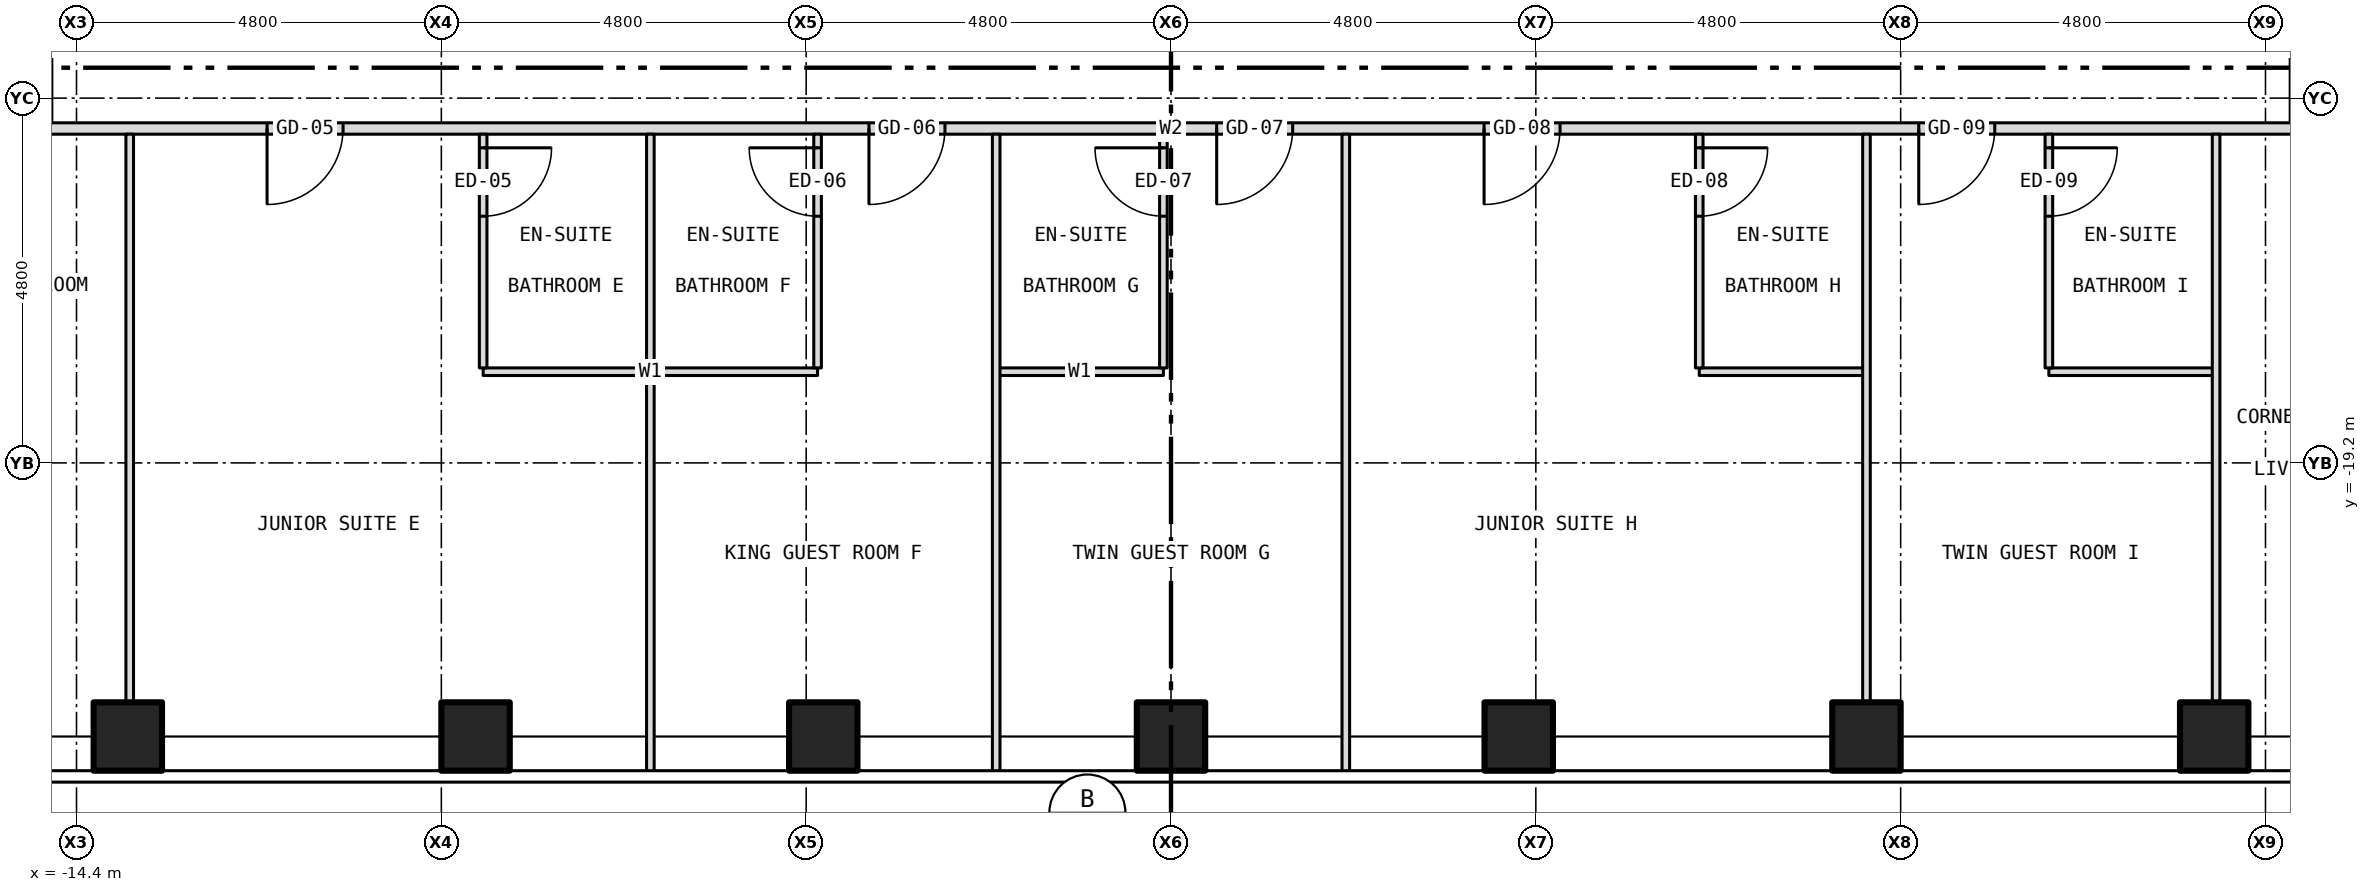
"""IFC4 building model, lengths in metres.
Left out: names, types, materials, properties, quantities, classifications, styles, units other than length and angle.
Written with IfcOpenShell. Run it as: python <this file> out.ifc"""

import sys

from ifc_helpers import new_model, si_unit, direction, frame, frame_2d, origin, origin_2d, place, context, subcontext, project, spatial, rectangle, hollow_rectangle, extrude, element, fill, save


model = new_model("IFC4")
c1 = context("Model", 3, precision=1e-05, world=origin(), true_north=direction((0.0, 1.0)))
c2 = subcontext(c1, "Body", "Model", "MODEL_VIEW")
j1 = project(units=[si_unit("LENGTHUNIT", "METRE"), si_unit("PLANEANGLEUNIT", "RADIAN")], contexts=[c1])
p1 = place(None, origin())
s1 = spatial("IfcSite", under=j1, at=p1, CompositionType="ELEMENT")
p2 = place(p1, origin())
s2 = spatial("IfcBuilding", under=s1, at=p2, CompositionType="ELEMENT")
p3 = place(p2, frame((0.0, 0.0, 92.5)))
s3 = spatial("IfcBuildingStorey", under=s2, at=p3, CompositionType="ELEMENT", Elevation=92.5)
for number, where, z_axis, x_axis in (
    (1, (-13.725, -22.8, -0.15), (0.0, 0.0, 1.0), (1.0, 0.0, 0.0)),
    (2, (-9.15, -22.8, -0.15), (0.0, 0.0, 1.0), (1.0, 0.0, 0.0)),
    (3, (-4.575, -22.8, -0.15), (0.0, 0.0, 1.0), (1.0, 0.0, 0.0)),
    (4, (0.0, -22.8, -0.15), (0.0, 0.0, 1.0), (1.0, 0.0, 0.0)),
    (5, (4.575, -22.8, -0.15), (0.0, 0.0, 1.0), (1.0, 0.0, 0.0)),
    (6, (9.15, -22.8, -0.15), (0.0, 0.0, 1.0), (1.0, 0.0, 0.0)),
    (7, (13.725, -22.8, -0.15), (0.0, 0.0, 1.0), (1.0, 0.0, 0.0)),
):
    element("IfcColumn", number, at=place(p3, frame(where, z_axis=z_axis, x_axis=x_axis)), inside=s3, PredefinedType="COLUMN", context=c2, shape_type="SweptSolid", body=[
        extrude(hollow_rectangle(XDim=0.9, YDim=0.9, WallThickness=0.05, at=origin_2d()), origin(), (0.0, 0.0, 1.0), 3.5),
    ])
p4 = place(p3, frame((-9.05, -18.0, 0.0), z_axis=(0.0, 0.0, 1.0), x_axis=(1.0, 0.0, 0.0)))
e8 = element("IfcWall", 8, at=p4, inside=s3, PredefinedType="PARTITIONING", context=c2, shape_type="SweptSolid", body=[
    extrude(rectangle(XDim=4.4, YDim=0.1, at=frame_2d((2.2, 0.0))), origin(), (0.0, 0.0, 1.0), 3.35),
])
for number, where, z_axis, x_axis in (
    (9, (-2.3, -18.0, 0.0), (0.0, 0.0, 1.0), (1.0, 0.0, 0.0)),
    (10, (6.95, -18.0, 0.0), (0.0, 0.0, 1.0), (1.0, 0.0, 0.0)),
    (11, (11.55, -18.0, 0.0), (0.0, 0.0, 1.0), (1.0, 0.0, 0.0)),
):
    element("IfcWall", number, at=place(p3, frame(where, z_axis=z_axis, x_axis=x_axis)), inside=s3, PredefinedType="PARTITIONING", context=c2, shape_type="SweptSolid", body=[
        extrude(rectangle(XDim=2.2, YDim=0.1, at=frame_2d((1.1, 0.0))), origin(), (0.0, 0.0, 1.0), 3.35),
    ])
p5 = place(p3, frame((-14.8, -14.8, 0.0), z_axis=(0.0, 0.0, 1.0), x_axis=(1.0, 0.0, 0.0)))
e12 = element("IfcWall", 12, at=p5, inside=s3, PredefinedType="PARTITIONING", context=c2, shape_type="SweptSolid", body=[
    extrude(rectangle(XDim=29.6, YDim=0.15, at=frame_2d((14.8, 0.0))), origin(), (0.0, 0.0, 1.0), 3.35),
])
p6 = place(p5, frame((2.907, 0.0, 0.0)))
e13 = element("IfcOpeningElement", 13, at=p6, cuts=e12, PredefinedType="OPENING", context=c2, shape_type="SweptSolid", body=[
    extrude(rectangle(XDim=1.0, YDim=2.1, at=frame_2d((0.5, 1.05))), frame((0.0, 0.087, 0.0), z_axis=(0.0, -1.0, 0.0), x_axis=(1.0, 0.0, 0.0)), (0.0, 0.0, 1.0), 0.174),
])
p7 = place(p5, frame((10.826, 0.0, 0.0)))
e14 = element("IfcOpeningElement", 14, at=p7, cuts=e12, PredefinedType="OPENING", context=c2, shape_type="SweptSolid", body=[
    extrude(rectangle(XDim=1.0, YDim=2.1, at=frame_2d((0.5, 1.05))), frame((0.0, 0.087, 0.0), z_axis=(0.0, -1.0, 0.0), x_axis=(1.0, 0.0, 0.0)), (0.0, 0.0, 1.0), 0.174),
])
p8 = place(p5, frame((15.401, 0.0, 0.0)))
e15 = element("IfcOpeningElement", 15, at=p8, cuts=e12, PredefinedType="OPENING", context=c2, shape_type="SweptSolid", body=[
    extrude(rectangle(XDim=1.0, YDim=2.1, at=frame_2d((0.5, 1.05))), frame((0.0, 0.087, 0.0), z_axis=(0.0, -1.0, 0.0), x_axis=(1.0, 0.0, 0.0)), (0.0, 0.0, 1.0), 0.174),
])
p9 = place(p5, frame((18.919, 0.0, 0.0)))
e16 = element("IfcOpeningElement", 16, at=p9, cuts=e12, PredefinedType="OPENING", context=c2, shape_type="SweptSolid", body=[
    extrude(rectangle(XDim=1.0, YDim=2.1, at=frame_2d((0.5, 1.05))), frame((0.0, 0.087, 0.0), z_axis=(0.0, -1.0, 0.0), x_axis=(1.0, 0.0, 0.0)), (0.0, 0.0, 1.0), 0.174),
])
p10 = place(p5, frame((24.638, 0.0, 0.0)))
e17 = element("IfcOpeningElement", 17, at=p10, cuts=e12, PredefinedType="OPENING", context=c2, shape_type="SweptSolid", body=[
    extrude(rectangle(XDim=1.0, YDim=2.1, at=frame_2d((0.5, 1.05))), frame((0.0, 0.087, 0.0), z_axis=(0.0, -1.0, 0.0), x_axis=(1.0, 0.0, 0.0)), (0.0, 0.0, 1.0), 0.174),
])
p11 = place(p3, frame((-13.7, -22.68, 0.0), z_axis=(0.0, 0.0, 1.0), x_axis=(0.0, 1.0, 0.0)))
e18 = element("IfcWall", 18, at=p11, inside=s3, PredefinedType="PARTITIONING", context=c2, shape_type="SweptSolid", body=[
    extrude(rectangle(XDim=7.805, YDim=0.1, at=frame_2d((3.902, 0.0))), origin(), (0.0, 0.0, 1.0), 3.35),
])
p12 = place(p3, frame((-9.05, -17.95, 0.0), z_axis=(0.0, 0.0, 1.0), x_axis=(0.0, 1.0, 0.0)))
e19 = element("IfcWall", 19, at=p12, inside=s3, PredefinedType="PARTITIONING", context=c2, shape_type="SweptSolid", body=[
    extrude(rectangle(XDim=3.075, YDim=0.1, at=frame_2d((1.538, 0.0))), origin(), (0.0, 0.0, 1.0), 3.35),
])
p13 = place(p12, frame((1.996, 0.0, 0.0)))
e20 = element("IfcOpeningElement", 20, at=p13, cuts=e19, PredefinedType="OPENING", context=c2, shape_type="SweptSolid", body=[
    extrude(rectangle(XDim=0.9, YDim=2.1, at=frame_2d((0.45, 1.05))), frame((0.0, 0.062, 0.0), z_axis=(0.0, -1.0, 0.0), x_axis=(1.0, 0.0, 0.0)), (0.0, 0.0, 1.0), 0.124),
])
p14 = place(p3, frame((-6.85, -23.28, 0.0), z_axis=(0.0, 0.0, 1.0), x_axis=(0.0, 1.0, 0.0)))
e21 = element("IfcWall", 21, at=p14, inside=s3, PredefinedType="PARTITIONING", context=c2, shape_type="SweptSolid", body=[
    extrude(rectangle(XDim=5.23, YDim=0.1, at=frame_2d((2.615, 0.0))), origin(), (0.0, 0.0, 1.0), 3.35),
])
p15 = place(p3, frame((-6.85, -17.95, 0.0), z_axis=(0.0, 0.0, 1.0), x_axis=(0.0, 1.0, 0.0)))
e22 = element("IfcWall", 22, at=p15, inside=s3, PredefinedType="PARTITIONING", context=c2, shape_type="SweptSolid", body=[
    extrude(rectangle(XDim=3.075, YDim=0.1, at=frame_2d((1.538, 0.0))), origin(), (0.0, 0.0, 1.0), 3.35),
])
p16 = place(p3, frame((-4.65, -17.95, 0.0), z_axis=(0.0, 0.0, 1.0), x_axis=(0.0, 1.0, 0.0)))
e23 = element("IfcWall", 23, at=p16, inside=s3, PredefinedType="PARTITIONING", context=c2, shape_type="SweptSolid", body=[
    extrude(rectangle(XDim=3.075, YDim=0.1, at=frame_2d((1.538, 0.0))), origin(), (0.0, 0.0, 1.0), 2.817),
])
p17 = place(p16, frame((1.996, 0.0, 0.0)))
e24 = element("IfcOpeningElement", 24, at=p17, cuts=e23, PredefinedType="OPENING", context=c2, shape_type="SweptSolid", body=[
    extrude(rectangle(XDim=0.9, YDim=2.1, at=frame_2d((0.45, 1.05))), frame((0.0, 0.062, 0.0), z_axis=(0.0, -1.0, 0.0), x_axis=(1.0, 0.0, 0.0)), (0.0, 0.0, 1.0), 0.124),
])
p18 = place(p3, frame((-2.3, -23.28, 0.0), z_axis=(0.0, 0.0, 1.0), x_axis=(0.0, 1.0, 0.0)))
e25 = element("IfcWall", 25, at=p18, inside=s3, PredefinedType="PARTITIONING", context=c2, shape_type="SweptSolid", body=[
    extrude(rectangle(XDim=8.405, YDim=0.1, at=frame_2d((4.203, 0.0))), origin(), (0.0, 0.0, 1.0), 3.35),
])
p19 = place(p3, frame((-0.1, -17.95, 0.0), z_axis=(0.0, 0.0, 1.0), x_axis=(0.0, 1.0, 0.0)))
e26 = element("IfcWall", 26, at=p19, inside=s3, PredefinedType="PARTITIONING", context=c2, shape_type="SweptSolid", body=[
    extrude(rectangle(XDim=3.075, YDim=0.1, at=frame_2d((1.538, 0.0))), origin(), (0.0, 0.0, 1.0), 2.728),
])
p20 = place(p19, frame((1.996, 0.0, 0.0)))
e27 = element("IfcOpeningElement", 27, at=p20, cuts=e26, PredefinedType="OPENING", context=c2, shape_type="SweptSolid", body=[
    extrude(rectangle(XDim=0.9, YDim=2.1, at=frame_2d((0.45, 1.05))), frame((0.0, 0.062, 0.0), z_axis=(0.0, -1.0, 0.0), x_axis=(1.0, 0.0, 0.0)), (0.0, 0.0, 1.0), 0.124),
])
p21 = place(p3, frame((2.3, -23.28, 0.0), z_axis=(0.0, 0.0, 1.0), x_axis=(0.0, 1.0, 0.0)))
e28 = element("IfcWall", 28, at=p21, inside=s3, PredefinedType="PARTITIONING", context=c2, shape_type="SweptSolid", body=[
    extrude(rectangle(XDim=8.405, YDim=0.1, at=frame_2d((4.203, 0.0))), origin(), (0.0, 0.0, 1.0), 3.35),
])
p22 = place(p3, frame((6.95, -17.95, 0.0), z_axis=(0.0, 0.0, 1.0), x_axis=(0.0, 1.0, 0.0)))
e29 = element("IfcWall", 29, at=p22, inside=s3, PredefinedType="PARTITIONING", context=c2, shape_type="SweptSolid", body=[
    extrude(rectangle(XDim=3.075, YDim=0.1, at=frame_2d((1.538, 0.0))), origin(), (0.0, 0.0, 1.0), 3.35),
])
p23 = place(p22, frame((1.996, 0.0, 0.0)))
e30 = element("IfcOpeningElement", 30, at=p23, cuts=e29, PredefinedType="OPENING", context=c2, shape_type="SweptSolid", body=[
    extrude(rectangle(XDim=0.9, YDim=2.1, at=frame_2d((0.45, 1.05))), frame((0.0, 0.062, 0.0), z_axis=(0.0, -1.0, 0.0), x_axis=(1.0, 0.0, 0.0)), (0.0, 0.0, 1.0), 0.124),
])
p24 = place(p3, frame((9.15, -22.68, 0.0), z_axis=(0.0, 0.0, 1.0), x_axis=(0.0, 1.0, 0.0)))
e31 = element("IfcWall", 31, at=p24, inside=s3, PredefinedType="PARTITIONING", context=c2, shape_type="SweptSolid", body=[
    extrude(rectangle(XDim=7.805, YDim=0.1, at=frame_2d((3.902, 0.0))), origin(), (0.0, 0.0, 1.0), 3.35),
])
p25 = place(p3, frame((11.55, -17.95, 0.0), z_axis=(0.0, 0.0, 1.0), x_axis=(0.0, 1.0, 0.0)))
e32 = element("IfcWall", 32, at=p25, inside=s3, PredefinedType="PARTITIONING", context=c2, shape_type="SweptSolid", body=[
    extrude(rectangle(XDim=3.075, YDim=0.1, at=frame_2d((1.538, 0.0))), origin(), (0.0, 0.0, 1.0), 3.35),
])
p26 = place(p25, frame((1.996, 0.0, 0.0)))
e33 = element("IfcOpeningElement", 33, at=p26, cuts=e32, PredefinedType="OPENING", context=c2, shape_type="SweptSolid", body=[
    extrude(rectangle(XDim=0.9, YDim=2.1, at=frame_2d((0.45, 1.05))), frame((0.0, 0.062, 0.0), z_axis=(0.0, -1.0, 0.0), x_axis=(1.0, 0.0, 0.0)), (0.0, 0.0, 1.0), 0.124),
])
p27 = place(p3, frame((13.75, -22.68, 0.0), z_axis=(0.0, 0.0, 1.0), x_axis=(0.0, 1.0, 0.0)))
e34 = element("IfcWall", 34, at=p27, inside=s3, PredefinedType="PARTITIONING", context=c2, shape_type="SweptSolid", body=[
    extrude(rectangle(XDim=7.805, YDim=0.1, at=frame_2d((3.902, 0.0))), origin(), (0.0, 0.0, 1.0), 3.35),
])
p28 = place(p6, origin())
e35 = element("IfcDoor", 35, at=p28, inside=s3, OperationType="SINGLE_SWING_LEFT", PredefinedType="DOOR", context=c2, shape_type="SweptSolid", body=[
    extrude(rectangle(XDim=1.0, YDim=2.1, at=frame_2d((0.5, 1.05))), frame((0.0, 0.025, 0.0), z_axis=(0.0, -1.0, 0.0), x_axis=(1.0, 0.0, 0.0)), (0.0, 0.0, 1.0), 0.05),
])
fill(e13, e35)
p29 = place(p13, origin())
e36 = element("IfcDoor", 36, at=p29, inside=s3, OperationType="SINGLE_SWING_RIGHT", PredefinedType="DOOR", context=c2, shape_type="SweptSolid", body=[
    extrude(rectangle(XDim=0.9, YDim=2.1, at=frame_2d((0.45, 1.05))), frame((0.0, 0.025, 0.0), z_axis=(0.0, -1.0, 0.0), x_axis=(1.0, 0.0, 0.0)), (0.0, 0.0, 1.0), 0.05),
])
fill(e20, e36)
p30 = place(p7, origin())
e37 = element("IfcDoor", 37, at=p30, inside=s3, OperationType="SINGLE_SWING_LEFT", PredefinedType="DOOR", context=c2, shape_type="SweptSolid", body=[
    extrude(rectangle(XDim=1.0, YDim=2.1, at=frame_2d((0.5, 1.05))), frame((0.0, 0.025, 0.0), z_axis=(0.0, -1.0, 0.0), x_axis=(1.0, 0.0, 0.0)), (0.0, 0.0, 1.0), 0.05),
])
fill(e14, e37)
p31 = place(p17, origin())
e38 = element("IfcDoor", 38, at=p31, inside=s3, OperationType="SINGLE_SWING_RIGHT", PredefinedType="DOOR", context=c2, shape_type="SweptSolid", body=[
    extrude(rectangle(XDim=0.9, YDim=2.1, at=frame_2d((0.45, 1.05))), frame((0.0, 0.025, 0.0), z_axis=(0.0, -1.0, 0.0), x_axis=(1.0, 0.0, 0.0)), (0.0, 0.0, 1.0), 0.05),
])
fill(e24, e38)
p32 = place(p8, origin())
e39 = element("IfcDoor", 39, at=p32, inside=s3, OperationType="SINGLE_SWING_LEFT", PredefinedType="DOOR", context=c2, shape_type="SweptSolid", body=[
    extrude(rectangle(XDim=1.0, YDim=2.1, at=frame_2d((0.5, 1.05))), frame((0.0, 0.025, 0.0), z_axis=(0.0, -1.0, 0.0), x_axis=(1.0, 0.0, 0.0)), (0.0, 0.0, 1.0), 0.05),
])
fill(e15, e39)
p33 = place(p20, origin())
e40 = element("IfcDoor", 40, at=p33, inside=s3, OperationType="SINGLE_SWING_RIGHT", PredefinedType="DOOR", context=c2, shape_type="SweptSolid", body=[
    extrude(rectangle(XDim=0.9, YDim=2.1, at=frame_2d((0.45, 1.05))), frame((0.0, 0.025, 0.0), z_axis=(0.0, -1.0, 0.0), x_axis=(1.0, 0.0, 0.0)), (0.0, 0.0, 1.0), 0.05),
])
fill(e27, e40)
p34 = place(p9, origin())
e41 = element("IfcDoor", 41, at=p34, inside=s3, OperationType="SINGLE_SWING_LEFT", PredefinedType="DOOR", context=c2, shape_type="SweptSolid", body=[
    extrude(rectangle(XDim=1.0, YDim=2.1, at=frame_2d((0.5, 1.05))), frame((0.0, 0.025, 0.0), z_axis=(0.0, -1.0, 0.0), x_axis=(1.0, 0.0, 0.0)), (0.0, 0.0, 1.0), 0.05),
])
fill(e16, e41)
p35 = place(p23, origin())
e42 = element("IfcDoor", 42, at=p35, inside=s3, OperationType="SINGLE_SWING_RIGHT", PredefinedType="DOOR", context=c2, shape_type="SweptSolid", body=[
    extrude(rectangle(XDim=0.9, YDim=2.1, at=frame_2d((0.45, 1.05))), frame((0.0, 0.025, 0.0), z_axis=(0.0, -1.0, 0.0), x_axis=(1.0, 0.0, 0.0)), (0.0, 0.0, 1.0), 0.05),
])
fill(e30, e42)
p36 = place(p10, origin())
e43 = element("IfcDoor", 43, at=p36, inside=s3, OperationType="SINGLE_SWING_LEFT", PredefinedType="DOOR", context=c2, shape_type="SweptSolid", body=[
    extrude(rectangle(XDim=1.0, YDim=2.1, at=frame_2d((0.5, 1.05))), frame((0.0, 0.025, 0.0), z_axis=(0.0, -1.0, 0.0), x_axis=(1.0, 0.0, 0.0)), (0.0, 0.0, 1.0), 0.05),
])
fill(e17, e43)
p37 = place(p26, origin())
e44 = element("IfcDoor", 44, at=p37, inside=s3, OperationType="SINGLE_SWING_RIGHT", PredefinedType="DOOR", context=c2, shape_type="SweptSolid", body=[
    extrude(rectangle(XDim=0.9, YDim=2.1, at=frame_2d((0.45, 1.05))), frame((0.0, 0.025, 0.0), z_axis=(0.0, -1.0, 0.0), x_axis=(1.0, 0.0, 0.0)), (0.0, 0.0, 1.0), 0.05),
])
fill(e33, e44)
save(model, sys.argv[1])
